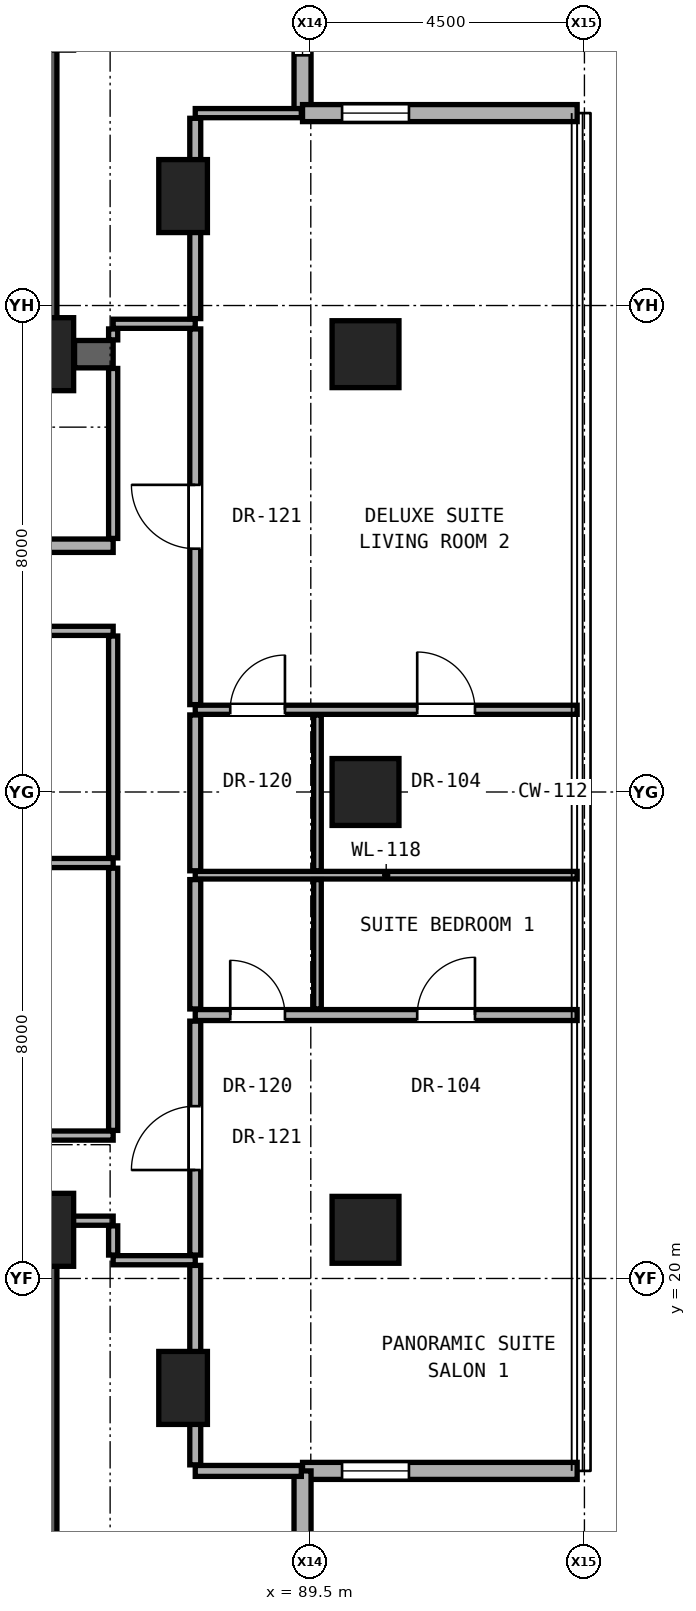
"""IFC4 building model, lengths in metres.
Left out: names, types, materials, properties, quantities, classifications, styles, units other than length and angle.
Written with IfcOpenShell. Run it as: python <this file> out.ifc"""

import sys

from ifc_helpers import new_model, si_unit, direction, frame, frame_2d, origin, origin_2d, place, context, subcontext, project, spatial, rectangle, hollow_rectangle, extrude, element, fill, save


model = new_model("IFC4")
c1 = context("Model", 3, precision=1e-05, world=origin(), true_north=direction((0.0, 1.0)))
c2 = subcontext(c1, "Body", "Model", "MODEL_VIEW")
j1 = project(units=[si_unit("LENGTHUNIT", "METRE"), si_unit("PLANEANGLEUNIT", "RADIAN")], contexts=[c1])
p1 = place(None, origin())
s1 = spatial("IfcSite", under=j1, at=p1, CompositionType="ELEMENT")
p2 = place(p1, origin())
s2 = spatial("IfcBuilding", under=s1, at=p2, CompositionType="ELEMENT")
p3 = place(p2, frame((0.0, 0.0, 91.7)))
s3 = spatial("IfcBuildingStorey", under=s2, at=p3, CompositionType="ELEMENT", Elevation=91.7)
for number, where, z_axis, x_axis in (
    (1, (85.0, 20.8, 0.0), (0.0, 0.0, 1.0), (1.0, 0.0, 0.0)),
    (2, (85.0, 35.2, 0.0), (0.0, 0.0, 1.0), (1.0, 0.0, 0.0)),
):
    element("IfcColumn", number, at=place(p3, frame(where, z_axis=z_axis, x_axis=x_axis)), inside=s3, PredefinedType="COLUMN", context=c2, shape_type="SweptSolid", body=[
        extrude(rectangle(XDim=1.2, YDim=1.2, at=origin_2d()), origin(), (0.0, 0.0, 1.0), 3.3),
    ])
for number, where, z_axis, x_axis in (
    (3, (90.4, 20.8, 0.0), (0.0, 0.0, 1.0), (1.0, 0.0, 0.0)),
    (4, (90.4, 28.0, 0.0), (0.0, 0.0, 1.0), (1.0, 0.0, 0.0)),
    (5, (90.4, 35.2, 0.0), (0.0, 0.0, 1.0), (1.0, 0.0, 0.0)),
):
    element("IfcColumn", number, at=place(p3, frame(where, z_axis=z_axis, x_axis=x_axis)), inside=s3, PredefinedType="COLUMN", context=c2, shape_type="SweptSolid", body=[
        extrude(hollow_rectangle(XDim=1.1, YDim=1.1, WallThickness=0.06, at=origin_2d()), origin(), (0.0, 0.0, 1.0), 3.3),
    ])
for number, where, z_axis, x_axis in (
    (6, (87.4, 18.2, 0.0), (0.0, 0.0, 1.0), (1.0, 0.0, 0.0)),
    (7, (87.4, 37.8, 0.0), (0.0, 0.0, 1.0), (1.0, 0.0, 0.0)),
):
    element("IfcColumn", number, at=place(p3, frame(where, z_axis=z_axis, x_axis=x_axis)), inside=s3, PredefinedType="PILASTER", context=c2, shape_type="SweptSolid", body=[
        extrude(rectangle(XDim=0.8, YDim=1.2, at=origin_2d()), origin(), (0.0, 0.0, 1.0), 3.3),
    ])
for number, where, z_axis, x_axis in (
    (8, (85.0, 35.2, 0.0), (0.0, 0.0, 1.0), (0.0, 1.0, 0.0)),
    (9, (85.0, 15.2, 0.0), (0.0, 0.0, 1.0), (0.0, 1.0, 0.0)),
):
    element("IfcWall", number, at=place(p3, frame(where, z_axis=z_axis, x_axis=x_axis)), inside=s3, PredefinedType="SHEAR", context=c2, shape_type="SweptSolid", body=[
        extrude(rectangle(XDim=5.6, YDim=0.65, at=frame_2d((2.8, 0.0))), origin(), (0.0, 0.0, 1.0), 3.08),
    ])
p4 = place(p3, frame((89.364, 39.165, 0.0), z_axis=(0.0, 0.0, 1.0), x_axis=(0.0, 1.0, 0.0)))
e10 = element("IfcWall", 10, at=p4, inside=s3, PredefinedType="SOLIDWALL", context=c2, shape_type="SweptSolid", body=[
    extrude(rectangle(XDim=4.516, YDim=0.28, at=frame_2d((2.258, 0.0))), origin(), (0.0, 0.0, 1.0), 3.06),
])
p5 = place(p4, frame((0.95, 0.0, 0.85)))
e11 = element("IfcOpeningElement", 11, at=p5, cuts=e10, PredefinedType="OPENING", context=c2, shape_type="SweptSolid", body=[
    extrude(rectangle(XDim=1.1, YDim=2.0, at=frame_2d((0.55, 1.0))), frame((0.0, 0.15, 0.0), z_axis=(0.0, -1.0, 0.0), x_axis=(1.0, 0.0, 0.0)), (0.0, 0.0, 1.0), 0.3),
])
p6 = place(p3, frame((89.364, 16.835, 0.0), z_axis=(0.0, 0.0, 1.0), x_axis=(1.0, 0.0, 0.0)))
e12 = element("IfcWall", 12, at=p6, inside=s3, PredefinedType="SOLIDWALL", context=c2, shape_type="SweptSolid", body=[
    extrude(rectangle(XDim=4.516, YDim=0.28, at=frame_2d((2.258, 0.0))), origin(), (0.0, 0.0, 1.0), 3.06),
])
p7 = place(p6, frame((0.65, 0.0, 0.85)))
e13 = element("IfcOpeningElement", 13, at=p7, cuts=e12, PredefinedType="OPENING", context=c2, shape_type="SweptSolid", body=[
    extrude(rectangle(XDim=1.1, YDim=2.0, at=frame_2d((0.55, 1.0))), frame((0.0, 0.15, 0.0), z_axis=(0.0, -1.0, 0.0), x_axis=(1.0, 0.0, 0.0)), (0.0, 0.0, 1.0), 0.3),
])
p8 = place(p3, frame((89.364, 12.319, 0.0), z_axis=(0.0, 0.0, 1.0), x_axis=(0.0, 1.0, 0.0)))
e14 = element("IfcWall", 14, at=p8, inside=s3, PredefinedType="SOLIDWALL", context=c2, shape_type="SweptSolid", body=[
    extrude(rectangle(XDim=4.516, YDim=0.28, at=frame_2d((2.258, 0.0))), origin(), (0.0, 0.0, 1.0), 3.06),
])
p9 = place(p3, frame((93.881, 39.165, 0.0), z_axis=(0.0, 0.0, 1.0), x_axis=(-1.0, 0.0, 0.0)))
e15 = element("IfcWall", 15, at=p9, inside=s3, PredefinedType="SOLIDWALL", context=c2, shape_type="SweptSolid", body=[
    extrude(rectangle(XDim=4.516, YDim=0.28, at=frame_2d((2.258, 0.0))), origin(), (0.0, 0.0, 1.0), 3.06),
])
p10 = place(p9, frame((2.766, 0.0, 0.85)))
e16 = element("IfcOpeningElement", 16, at=p10, cuts=e15, PredefinedType="OPENING", context=c2, shape_type="SweptSolid", body=[
    extrude(rectangle(XDim=1.1, YDim=2.0, at=frame_2d((0.55, 1.0))), frame((0.0, 0.15, 0.0), z_axis=(0.0, -1.0, 0.0), x_axis=(1.0, 0.0, 0.0)), (0.0, 0.0, 1.0), 0.3),
])
p11 = place(p3, frame((87.6, 16.835, 0.0), z_axis=(0.0, 0.0, 1.0), x_axis=(1.0, 0.0, 0.0)))
e17 = element("IfcWall", 17, at=p11, inside=s3, PredefinedType="PARTITIONING", context=c2, shape_type="SweptSolid", body=[
    extrude(rectangle(XDim=1.744, YDim=0.18, at=frame_2d((0.872, 0.0))), origin(), (0.0, 0.0, 1.0), 3.08),
])
p12 = place(p3, frame((86.25, 20.3, 0.0), z_axis=(0.0, 0.0, 1.0), x_axis=(1.0, 0.0, 0.0)))
e18 = element("IfcWall", 18, at=p12, inside=s3, PredefinedType="PARTITIONING", context=c2, shape_type="SweptSolid", body=[
    extrude(rectangle(XDim=1.35, YDim=0.15, at=frame_2d((0.675, 0.0))), origin(), (0.0, 0.0, 1.0), 3.08),
])
p13 = place(p3, frame((85.32, 20.95, 0.0), z_axis=(0.0, 0.0, 1.0), x_axis=(1.0, 0.0, 0.0)))
e19 = element("IfcWall", 19, at=p13, inside=s3, PredefinedType="PARTITIONING", context=c2, shape_type="SweptSolid", body=[
    extrude(rectangle(XDim=0.93, YDim=0.15, at=frame_2d((0.465, 0.0))), origin(), (0.0, 0.0, 1.0), 2.472),
])
p14 = place(p3, frame((66.62, 22.35, 0.0), z_axis=(0.0, 0.0, 1.0), x_axis=(1.0, 0.0, 0.0)))
e20 = element("IfcWall", 20, at=p14, inside=s3, PredefinedType="PARTITIONING", context=c2, shape_type="SweptSolid", body=[
    extrude(rectangle(XDim=19.63, YDim=0.15, at=frame_2d((9.815, 0.0))), origin(), (0.0, 0.0, 1.0), 2.145),
])
p15 = place(p14, frame((12.085, 0.0, 0.0)))
e21 = element("IfcOpeningElement", 21, at=p15, cuts=e20, PredefinedType="OPENING", context=c2, shape_type="SweptSolid", body=[
    extrude(rectangle(XDim=0.85, YDim=2.01, at=frame_2d((0.425, 1.005))), frame((0.0, 0.085, 0.0), z_axis=(0.0, -1.0, 0.0), x_axis=(1.0, 0.0, 0.0)), (0.0, 0.0, 1.0), 0.17),
])
p16 = place(p3, frame((87.6, 24.332, 0.0), z_axis=(0.0, 0.0, 1.0), x_axis=(1.0, 0.0, 0.0)))
e22 = element("IfcWall", 22, at=p16, inside=s3, PredefinedType="PARTITIONING", context=c2, shape_type="SweptSolid", body=[
    extrude(rectangle(XDim=6.28, YDim=0.18, at=frame_2d((3.14, 0.0))), origin(), (0.0, 0.0, 1.0), 2.216),
])
p17 = place(p16, frame((3.65, 0.0, 0.0)))
e23 = element("IfcOpeningElement", 23, at=p17, cuts=e22, PredefinedType="OPENING", context=c2, shape_type="SweptSolid", body=[
    extrude(rectangle(XDim=0.95, YDim=2.15, at=frame_2d((0.475, 1.075))), frame((0.0, 0.1, 0.0), z_axis=(0.0, -1.0, 0.0), x_axis=(1.0, 0.0, 0.0)), (0.0, 0.0, 1.0), 0.2),
])
p18 = place(p16, frame((0.575, 0.0, 0.0)))
e24 = element("IfcOpeningElement", 24, at=p18, cuts=e22, PredefinedType="OPENING", context=c2, shape_type="SweptSolid", body=[
    extrude(rectangle(XDim=0.9, YDim=2.1, at=frame_2d((0.45, 1.05))), frame((0.0, 0.1, 0.0), z_axis=(0.0, -1.0, 0.0), x_axis=(1.0, 0.0, 0.0)), (0.0, 0.0, 1.0), 0.2),
])
p19 = place(p3, frame((87.6, 26.632, 0.0), z_axis=(0.0, 0.0, 1.0), x_axis=(1.0, 0.0, 0.0)))
e25 = element("IfcWall", 25, at=p19, inside=s3, PredefinedType="PARTITIONING", context=c2, shape_type="SweptSolid", body=[
    extrude(rectangle(XDim=6.28, YDim=0.125, at=frame_2d((3.14, 0.0))), origin(), (0.0, 0.0, 1.0), 2.216),
])
p20 = place(p3, frame((72.05, 26.832, 0.0), z_axis=(0.0, 0.0, 1.0), x_axis=(1.0, 0.0, 0.0)))
e26 = element("IfcWall", 26, at=p20, inside=s3, PredefinedType="PARTITIONING", context=c2, shape_type="SweptSolid", body=[
    extrude(rectangle(XDim=14.2, YDim=0.15, at=frame_2d((7.1, 0.0))), origin(), (0.0, 0.0, 1.0), 2.145),
])
p21 = place(p3, frame((87.6, 29.352, 0.0), z_axis=(0.0, 0.0, 1.0), x_axis=(1.0, 0.0, 0.0)))
e27 = element("IfcWall", 27, at=p21, inside=s3, PredefinedType="PARTITIONING", context=c2, shape_type="SweptSolid", body=[
    extrude(rectangle(XDim=6.28, YDim=0.15, at=frame_2d((3.14, 0.0))), origin(), (0.0, 0.0, 1.0), 2.216),
])
p22 = place(p21, frame((3.65, 0.0, 0.0)))
e28 = element("IfcOpeningElement", 28, at=p22, cuts=e27, PredefinedType="OPENING", context=c2, shape_type="SweptSolid", body=[
    extrude(rectangle(XDim=0.95, YDim=2.15, at=frame_2d((0.475, 1.075))), frame((0.0, 0.085, 0.0), z_axis=(0.0, -1.0, 0.0), x_axis=(1.0, 0.0, 0.0)), (0.0, 0.0, 1.0), 0.17),
])
p23 = place(p21, frame((0.575, 0.0, 0.0)))
e29 = element("IfcOpeningElement", 29, at=p23, cuts=e27, PredefinedType="OPENING", context=c2, shape_type="SweptSolid", body=[
    extrude(rectangle(XDim=0.9, YDim=2.1, at=frame_2d((0.45, 1.05))), frame((0.0, 0.085, 0.0), z_axis=(0.0, -1.0, 0.0), x_axis=(1.0, 0.0, 0.0)), (0.0, 0.0, 1.0), 0.17),
])
p24 = place(p3, frame((66.62, 30.65, 0.0), z_axis=(0.0, 0.0, 1.0), x_axis=(1.0, 0.0, 0.0)))
e30 = element("IfcWall", 30, at=p24, inside=s3, PredefinedType="PARTITIONING", context=c2, shape_type="SweptSolid", body=[
    extrude(rectangle(XDim=19.63, YDim=0.15, at=frame_2d((9.815, 0.0))), origin(), (0.0, 0.0, 1.0), 2.145),
])
p25 = place(p24, frame((3.855, 0.0, 0.0)))
e31 = element("IfcOpeningElement", 31, at=p25, cuts=e30, PredefinedType="OPENING", context=c2, shape_type="SweptSolid", body=[
    extrude(rectangle(XDim=0.85, YDim=2.01, at=frame_2d((0.425, 1.005))), frame((0.0, 0.085, 0.0), z_axis=(0.0, -1.0, 0.0), x_axis=(1.0, 0.0, 0.0)), (0.0, 0.0, 1.0), 0.17),
])
p26 = place(p24, frame((12.085, 0.0, 0.0)))
e32 = element("IfcOpeningElement", 32, at=p26, cuts=e30, PredefinedType="OPENING", context=c2, shape_type="SweptSolid", body=[
    extrude(rectangle(XDim=0.85, YDim=2.01, at=frame_2d((0.425, 1.005))), frame((0.0, 0.085, 0.0), z_axis=(0.0, -1.0, 0.0), x_axis=(1.0, 0.0, 0.0)), (0.0, 0.0, 1.0), 0.17),
])
p27 = place(p3, frame((71.55, 32.05, 0.0), z_axis=(0.0, 0.0, 1.0), x_axis=(1.0, 0.0, 0.0)))
e33 = element("IfcWall", 33, at=p27, inside=s3, PredefinedType="SOLIDWALL", context=c2, shape_type="SweptSolid", body=[
    extrude(rectangle(XDim=14.7, YDim=0.22, at=frame_2d((7.35, 0.0))), origin(), (0.0, 0.0, 1.0), 2.145),
])
p28 = place(p27, frame((11.39, 0.0, 0.0)))
e34 = element("IfcOpeningElement", 34, at=p28, cuts=e33, PredefinedType="OPENING", context=c2, shape_type="SweptSolid", body=[
    extrude(rectangle(XDim=0.85, YDim=2.01, at=frame_2d((0.425, 1.005))), frame((0.0, 0.12, 0.0), z_axis=(0.0, -1.0, 0.0), x_axis=(1.0, 0.0, 0.0)), (0.0, 0.0, 1.0), 0.24),
])
p29 = place(p27, frame((6.065, 0.0, 0.0)))
e35 = element("IfcOpeningElement", 35, at=p29, cuts=e33, PredefinedType="OPENING", context=c2, shape_type="SweptSolid", body=[
    extrude(rectangle(XDim=0.85, YDim=2.01, at=frame_2d((0.425, 1.005))), frame((0.0, 0.12, 0.0), z_axis=(0.0, -1.0, 0.0), x_axis=(1.0, 0.0, 0.0)), (0.0, 0.0, 1.0), 0.24),
])
p30 = place(p27, frame((0.7, 0.0, 0.0)))
e36 = element("IfcOpeningElement", 36, at=p30, cuts=e33, PredefinedType="OPENING", context=c2, shape_type="SweptSolid", body=[
    extrude(rectangle(XDim=0.85, YDim=2.01, at=frame_2d((0.425, 1.005))), frame((0.0, 0.12, 0.0), z_axis=(0.0, -1.0, 0.0), x_axis=(1.0, 0.0, 0.0)), (0.0, 0.0, 1.0), 0.24),
])
p31 = place(p27, frame((2.55, 0.0, 0.0)))
e37 = element("IfcOpeningElement", 37, at=p31, cuts=e33, PredefinedType="OPENING", context=c2, shape_type="SweptSolid", body=[
    extrude(rectangle(XDim=0.85, YDim=2.01, at=frame_2d((0.425, 1.005))), frame((0.0, 0.12, 0.0), z_axis=(0.0, -1.0, 0.0), x_axis=(1.0, 0.0, 0.0)), (0.0, 0.0, 1.0), 0.24),
])
p32 = place(p3, frame((85.615, 35.2, 0.0), z_axis=(0.0, 0.0, 1.0), x_axis=(1.0, 0.0, 0.0)))
e38 = element("IfcWall", 38, at=p32, inside=s3, PredefinedType="SHEAR", context=c2, shape_type="SweptSolid", body=[
    extrude(rectangle(XDim=0.635, YDim=0.45, at=frame_2d((0.317, 0.0))), origin(), (0.0, 0.0, 1.0), 3.08),
])
p33 = place(p3, frame((86.25, 35.7, 0.0), z_axis=(0.0, 0.0, 1.0), x_axis=(1.0, 0.0, 0.0)))
e39 = element("IfcWall", 39, at=p33, inside=s3, PredefinedType="PARTITIONING", context=c2, shape_type="SweptSolid", body=[
    extrude(rectangle(XDim=1.35, YDim=0.15, at=frame_2d((0.675, 0.0))), origin(), (0.0, 0.0, 1.0), 3.08),
])
p34 = place(p3, frame((87.6, 39.164, 0.0), z_axis=(0.0, 0.0, 1.0), x_axis=(1.0, 0.0, 0.0)))
e40 = element("IfcWall", 40, at=p34, inside=s3, PredefinedType="PARTITIONING", context=c2, shape_type="SweptSolid", body=[
    extrude(rectangle(XDim=1.744, YDim=0.15, at=frame_2d((0.872, 0.0))), origin(), (0.0, 0.0, 1.0), 3.08),
])
p35 = place(p3, frame((86.25, 20.385, 0.0), z_axis=(0.0, 0.0, 1.0), x_axis=(0.0, 1.0, 0.0)))
e41 = element("IfcWall", 41, at=p35, inside=s3, PredefinedType="PARTITIONING", context=c2, shape_type="SweptSolid", body=[
    extrude(rectangle(XDim=0.48, YDim=0.15, at=frame_2d((0.24, 0.0))), origin(), (0.0, 0.0, 1.0), 2.472),
])
p36 = place(p3, frame((86.25, 22.435, 0.0), z_axis=(0.0, 0.0, 1.0), x_axis=(0.0, 1.0, 0.0)))
e42 = element("IfcWall", 42, at=p36, inside=s3, PredefinedType="PARTITIONING", context=c2, shape_type="SweptSolid", body=[
    extrude(rectangle(XDim=4.312, YDim=0.15, at=frame_2d((2.156, 0.0))), origin(), (0.0, 0.0, 1.0), 3.08),
])
p37 = place(p3, frame((86.25, 26.917, 0.0), z_axis=(0.0, 0.0, 1.0), x_axis=(0.0, 1.0, 0.0)))
e43 = element("IfcWall", 43, at=p37, inside=s3, PredefinedType="PARTITIONING", context=c2, shape_type="SweptSolid", body=[
    extrude(rectangle(XDim=3.648, YDim=0.15, at=frame_2d((1.824, 0.0))), origin(), (0.0, 0.0, 1.0), 2.299),
])
p38 = place(p3, frame((86.25, 32.17, 0.0), z_axis=(0.0, 0.0, 1.0), x_axis=(0.0, 1.0, 0.0)))
e44 = element("IfcWall", 44, at=p38, inside=s3, PredefinedType="PARTITIONING", context=c2, shape_type="SweptSolid", body=[
    extrude(rectangle(XDim=2.795, YDim=0.15, at=frame_2d((1.397, 0.0))), origin(), (0.0, 0.0, 1.0), 2.472),
])
p39 = place(p3, frame((86.25, 35.435, 0.0), z_axis=(0.0, 0.0, 1.0), x_axis=(0.0, 1.0, 0.0)))
e45 = element("IfcWall", 45, at=p39, inside=s3, PredefinedType="PARTITIONING", context=c2, shape_type="SweptSolid", body=[
    extrude(rectangle(XDim=0.18, YDim=0.15, at=frame_2d((0.09, 0.0))), origin(), (0.0, 0.0, 1.0), 2.472),
])
p40 = place(p3, frame((87.6, 16.935, 0.0), z_axis=(0.0, 0.0, 1.0), x_axis=(0.0, 1.0, 0.0)))
e46 = element("IfcWall", 46, at=p40, inside=s3, PredefinedType="PARTITIONING", context=c2, shape_type="SweptSolid", body=[
    extrude(rectangle(XDim=3.28, YDim=0.18, at=frame_2d((1.64, 0.0))), origin(), (0.0, 0.0, 1.0), 2.456),
])
p41 = place(p3, frame((87.6, 20.385, 0.0), z_axis=(0.0, 0.0, 1.0), x_axis=(0.0, 1.0, 0.0)))
e47 = element("IfcWall", 47, at=p41, inside=s3, PredefinedType="PARTITIONING", context=c2, shape_type="SweptSolid", body=[
    extrude(rectangle(XDim=3.847, YDim=0.18, at=frame_2d((1.923, 0.0))), origin(), (0.0, 0.0, 1.0), 2.472),
])
p42 = place(p41, frame((1.398, 0.0, 0.0)))
e48 = element("IfcOpeningElement", 48, at=p42, cuts=e47, PredefinedType="OPENING", context=c2, shape_type="SweptSolid", body=[
    extrude(rectangle(XDim=1.05, YDim=2.2, at=frame_2d((0.525, 1.1))), frame((0.0, 0.1, 0.0), z_axis=(0.0, -1.0, 0.0), x_axis=(1.0, 0.0, 0.0)), (0.0, 0.0, 1.0), 0.2),
])
p43 = place(p3, frame((87.6, 24.432, 0.0), z_axis=(0.0, 0.0, 1.0), x_axis=(0.0, 1.0, 0.0)))
e49 = element("IfcWall", 49, at=p43, inside=s3, PredefinedType="PARTITIONING", context=c2, shape_type="SweptSolid", body=[
    extrude(rectangle(XDim=2.128, YDim=0.18, at=frame_2d((1.064, 0.0))), origin(), (0.0, 0.0, 1.0), 3.08),
])
p44 = place(p3, frame((87.6, 26.705, 0.0), z_axis=(0.0, 0.0, 1.0), x_axis=(0.0, 1.0, 0.0)))
e50 = element("IfcWall", 50, at=p44, inside=s3, PredefinedType="PARTITIONING", context=c2, shape_type="SweptSolid", body=[
    extrude(rectangle(XDim=2.562, YDim=0.18, at=frame_2d((1.281, 0.0))), origin(), (0.0, 0.0, 1.0), 2.299),
])
p45 = place(p3, frame((87.6, 29.437, 0.0), z_axis=(0.0, 0.0, 1.0), x_axis=(0.0, 1.0, 0.0)))
e51 = element("IfcWall", 51, at=p45, inside=s3, PredefinedType="PARTITIONING", context=c2, shape_type="SweptSolid", body=[
    extrude(rectangle(XDim=6.178, YDim=0.18, at=frame_2d((3.089, 0.0))), origin(), (0.0, 0.0, 1.0), 2.472),
])
p46 = place(p45, frame((2.564, 0.0, 0.0)))
e52 = element("IfcOpeningElement", 52, at=p46, cuts=e51, PredefinedType="OPENING", context=c2, shape_type="SweptSolid", body=[
    extrude(rectangle(XDim=1.05, YDim=2.2, at=frame_2d((0.525, 1.1))), frame((0.0, 0.1, 0.0), z_axis=(0.0, -1.0, 0.0), x_axis=(1.0, 0.0, 0.0)), (0.0, 0.0, 1.0), 0.2),
])
p47 = place(p3, frame((87.6, 35.785, 0.0), z_axis=(0.0, 0.0, 1.0), x_axis=(0.0, 1.0, 0.0)))
e53 = element("IfcWall", 53, at=p47, inside=s3, PredefinedType="PARTITIONING", context=c2, shape_type="SweptSolid", body=[
    extrude(rectangle(XDim=3.294, YDim=0.18, at=frame_2d((1.647, 0.0))), origin(), (0.0, 0.0, 1.0), 2.456),
])
p48 = place(p3, frame((89.61, 24.432, 0.0), z_axis=(0.0, 0.0, 1.0), x_axis=(0.0, 1.0, 0.0)))
e54 = element("IfcWall", 54, at=p48, inside=s3, PredefinedType="PARTITIONING", context=c2, shape_type="SweptSolid", body=[
    extrude(rectangle(XDim=2.128, YDim=0.125, at=frame_2d((1.064, 0.0))), origin(), (0.0, 0.0, 1.0), 3.08),
])
p49 = place(p3, frame((89.61, 26.705, 0.0), z_axis=(0.0, 0.0, 1.0), x_axis=(0.0, 1.0, 0.0)))
e55 = element("IfcWall", 55, at=p49, inside=s3, PredefinedType="PARTITIONING", context=c2, shape_type="SweptSolid", body=[
    extrude(rectangle(XDim=2.562, YDim=0.125, at=frame_2d((1.281, 0.0))), origin(), (0.0, 0.0, 1.0), 2.299),
])
p50 = place(p5, origin())
e56 = element("IfcWindow", 56, at=p50, inside=s3, PartitioningType="SINGLE_PANEL", PredefinedType="WINDOW", context=c2, shape_type="SweptSolid", body=[
    extrude(rectangle(XDim=1.1, YDim=2.0, at=frame_2d((0.55, 1.0))), frame((0.0, 0.03, 0.0), z_axis=(0.0, -1.0, 0.0), x_axis=(1.0, 0.0, 0.0)), (0.0, 0.0, 1.0), 0.06),
])
fill(e11, e56)
p51 = place(p7, origin())
e57 = element("IfcWindow", 57, at=p51, inside=s3, PartitioningType="SINGLE_PANEL", PredefinedType="WINDOW", context=c2, shape_type="SweptSolid", body=[
    extrude(rectangle(XDim=1.1, YDim=2.0, at=frame_2d((0.55, 1.0))), frame((0.0, 0.03, 0.0), z_axis=(0.0, -1.0, 0.0), x_axis=(1.0, 0.0, 0.0)), (0.0, 0.0, 1.0), 0.06),
])
fill(e13, e57)
p52 = place(p10, origin())
e58 = element("IfcWindow", 58, at=p52, inside=s3, PartitioningType="SINGLE_PANEL", PredefinedType="WINDOW", context=c2, shape_type="SweptSolid", body=[
    extrude(rectangle(XDim=1.1, YDim=2.0, at=frame_2d((0.55, 1.0))), frame((0.0, 0.03, 0.0), z_axis=(0.0, -1.0, 0.0), x_axis=(1.0, 0.0, 0.0)), (0.0, 0.0, 1.0), 0.06),
])
fill(e16, e58)
p53 = place(p42, origin())
e59 = element("IfcDoor", 59, at=p53, inside=s3, OperationType="SINGLE_SWING_LEFT", PredefinedType="DOOR", context=c2, shape_type="SweptSolid", body=[
    extrude(rectangle(XDim=1.05, YDim=2.2, at=frame_2d((0.525, 1.1))), frame((0.0, 0.025, 0.0), z_axis=(0.0, -1.0, 0.0), x_axis=(1.0, 0.0, 0.0)), (0.0, 0.0, 1.0), 0.05),
])
fill(e48, e59)
p54 = place(p17, origin())
e60 = element("IfcDoor", 60, at=p54, inside=s3, OperationType="SINGLE_SWING_RIGHT", PredefinedType="DOOR", context=c2, shape_type="SweptSolid", body=[
    extrude(rectangle(XDim=0.95, YDim=2.15, at=frame_2d((0.475, 1.075))), frame((0.0, 0.025, 0.0), z_axis=(0.0, -1.0, 0.0), x_axis=(1.0, 0.0, 0.0)), (0.0, 0.0, 1.0), 0.05),
])
fill(e23, e60)
p55 = place(p18, origin())
e61 = element("IfcDoor", 61, at=p55, inside=s3, OperationType="SINGLE_SWING_LEFT", PredefinedType="DOOR", context=c2, shape_type="SweptSolid", body=[
    extrude(rectangle(XDim=0.9, YDim=2.1, at=frame_2d((0.45, 1.05))), frame((0.0, 0.025, 0.0), z_axis=(0.0, -1.0, 0.0), x_axis=(1.0, 0.0, 0.0)), (0.0, 0.0, 1.0), 0.05),
])
fill(e24, e61)
p56 = place(p46, origin())
e62 = element("IfcDoor", 62, at=p56, inside=s3, OperationType="SINGLE_SWING_RIGHT", PredefinedType="DOOR", context=c2, shape_type="SweptSolid", body=[
    extrude(rectangle(XDim=1.05, YDim=2.2, at=frame_2d((0.525, 1.1))), frame((0.0, 0.025, 0.0), z_axis=(0.0, -1.0, 0.0), x_axis=(1.0, 0.0, 0.0)), (0.0, 0.0, 1.0), 0.05),
])
fill(e52, e62)
p57 = place(p22, origin())
e63 = element("IfcDoor", 63, at=p57, inside=s3, OperationType="SINGLE_SWING_LEFT", PredefinedType="DOOR", context=c2, shape_type="SweptSolid", body=[
    extrude(rectangle(XDim=0.95, YDim=2.15, at=frame_2d((0.475, 1.075))), frame((0.0, 0.025, 0.0), z_axis=(0.0, -1.0, 0.0), x_axis=(1.0, 0.0, 0.0)), (0.0, 0.0, 1.0), 0.05),
])
fill(e28, e63)
p58 = place(p23, origin())
e64 = element("IfcDoor", 64, at=p58, inside=s3, OperationType="SINGLE_SWING_RIGHT", PredefinedType="DOOR", context=c2, shape_type="SweptSolid", body=[
    extrude(rectangle(XDim=0.9, YDim=2.1, at=frame_2d((0.45, 1.05))), frame((0.0, 0.025, 0.0), z_axis=(0.0, -1.0, 0.0), x_axis=(1.0, 0.0, 0.0)), (0.0, 0.0, 1.0), 0.05),
])
fill(e29, e64)
save(model, sys.argv[1])
